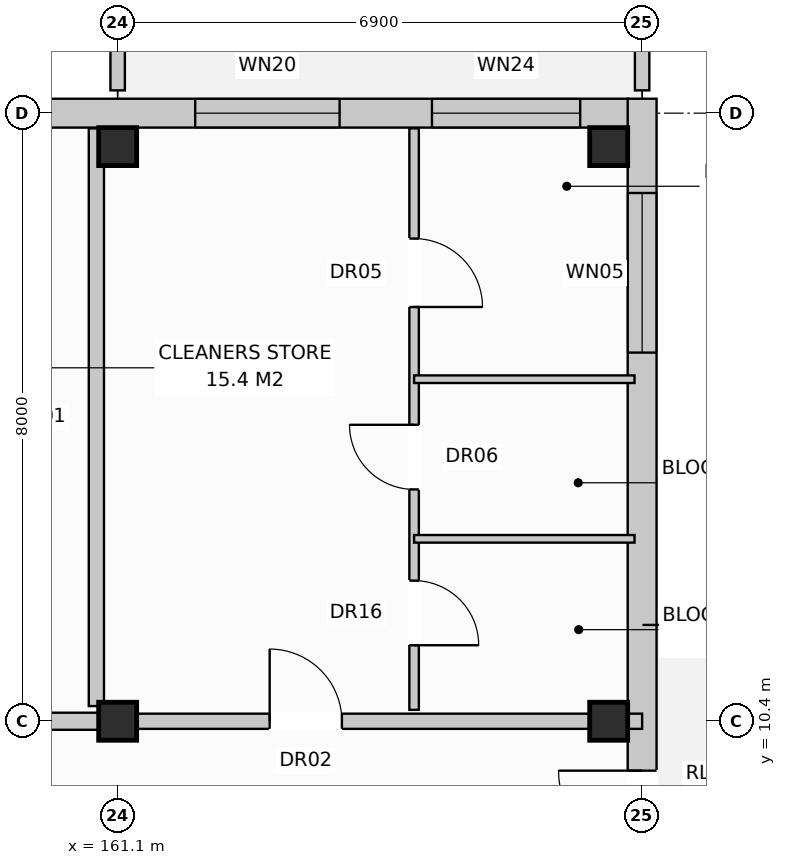
"""IFC4 building model, lengths in metres.
Left out: names, types, materials, properties, quantities, classifications, styles, units other than length and angle.
Written with IfcOpenShell. Run it as: python <this file> out.ifc"""

import sys

from ifc_helpers import new_model, si_unit, direction, frame, frame_2d, origin, origin_with_axes, origin_2d, place, context, subcontext, project, spatial, rectangle, extrude, element, fill, save


model = new_model("IFC4")
c1 = context("Model", 3, precision=1e-05, world=origin(), true_north=direction((0.0, 1.0)))
c2 = subcontext(c1, "Body", "Model", "MODEL_VIEW")
j1 = project(units=[si_unit("LENGTHUNIT", "METRE"), si_unit("PLANEANGLEUNIT", "RADIAN")], contexts=[c1])
p1 = place(None, origin())
s1 = spatial("IfcSite", under=j1, at=p1, CompositionType="ELEMENT")
p2 = place(p1, origin())
s2 = spatial("IfcBuilding", under=s1, at=p2, CompositionType="ELEMENT")
p3 = place(p2, frame((0.0, 0.0, 4.4)))
s3 = spatial("IfcBuildingStorey", under=s2, at=p3, CompositionType="ELEMENT", Elevation=4.4)
for number, where, z_axis, x_axis in (
    (1, (161.1, 10.4, 0.0), (0.0, 0.0, 1.0), (1.0, 0.0, 0.0)),
    (2, (161.1, 17.96, 0.0), (0.0, 0.0, 1.0), (1.0, 0.0, 0.0)),
    (3, (167.56, 10.4, 0.0), (0.0, 0.0, 1.0), (1.0, 0.0, 0.0)),
    (4, (167.56, 17.96, 0.0), (0.0, 0.0, 1.0), (1.0, 0.0, 0.0)),
):
    element("IfcColumn", number, at=place(p3, frame(where, z_axis=z_axis, x_axis=x_axis)), inside=s3, PredefinedType="COLUMN", context=c2, shape_type="SweptSolid", body=[
        extrude(rectangle(XDim=0.5, YDim=0.5, at=origin_2d()), origin(), (0.0, 0.0, 1.0), 3.6),
    ])
p4 = place(p3, frame((150.95, 18.4, 0.0), z_axis=(0.0, 0.0, 1.0), x_axis=(1.0, 0.0, 0.0)))
e5 = element("IfcWall", 5, at=p4, inside=s3, PredefinedType="STANDARD", context=c2, shape_type="SweptSolid", body=[
    extrude(rectangle(XDim=16.87, YDim=0.38, at=frame_2d((8.435, 0.0))), origin(), (0.0, 0.0, 1.0), 3.33),
])
p5 = place(p4, frame((11.17, 0.0, 0.8)))
e6 = element("IfcOpeningElement", 6, at=p5, cuts=e5, PredefinedType="OPENING", context=c2, shape_type="SweptSolid", body=[
    extrude(rectangle(XDim=1.9, YDim=1.85, at=frame_2d((0.95, 0.925))), frame((0.0, 0.202, 0.0), z_axis=(0.0, -1.0, 0.0), x_axis=(1.0, 0.0, 0.0)), (0.0, 0.0, 1.0), 0.404),
])
p6 = place(p4, frame((14.285, 0.0, 0.8)))
e7 = element("IfcOpeningElement", 7, at=p6, cuts=e5, PredefinedType="OPENING", context=c2, shape_type="SweptSolid", body=[
    extrude(rectangle(XDim=1.95, YDim=1.65, at=frame_2d((0.975, 0.825))), frame((0.0, 0.202, 0.0), z_axis=(0.0, -1.0, 0.0), x_axis=(1.0, 0.0, 0.0)), (0.0, 0.0, 1.0), 0.404),
])
p7 = place(p3, frame((168.0, -0.19, 0.0), z_axis=(0.0, 0.0, 1.0), x_axis=(0.0, 1.0, 0.0)))
e8 = element("IfcWall", 8, at=p7, inside=s3, PredefinedType="STANDARD", context=c2, shape_type="SweptSolid", body=[
    extrude(rectangle(XDim=18.78, YDim=0.38, at=frame_2d((9.39, 0.0))), origin(), (0.0, 0.0, 1.0), 3.33),
])
p8 = place(p7, frame((8.84, 0.0, 0.0)))
e9 = element("IfcOpeningElement", 9, at=p8, cuts=e8, PredefinedType="OPENING", context=c2, shape_type="SweptSolid", body=[
    extrude(rectangle(XDim=1.1, YDim=2.1, at=frame_2d((0.55, 1.05))), frame((0.0, 0.202, 0.0), z_axis=(0.0, -1.0, 0.0), x_axis=(1.0, 0.0, 0.0)), (0.0, 0.0, 1.0), 0.404),
])
p9 = place(p7, frame((1.24, 0.0, 0.72)))
e10 = element("IfcOpeningElement", 10, at=p9, cuts=e8, PredefinedType="OPENING", context=c2, shape_type="SweptSolid", body=[
    extrude(rectangle(XDim=2.1, YDim=1.9, at=frame_2d((1.05, 0.95))), frame((0.0, 0.202, 0.0), z_axis=(0.0, -1.0, 0.0), x_axis=(1.0, 0.0, 0.0)), (0.0, 0.0, 1.0), 0.404),
])
p10 = place(p7, frame((15.44, 0.0, 0.72)))
e11 = element("IfcOpeningElement", 11, at=p10, cuts=e8, PredefinedType="OPENING", context=c2, shape_type="SweptSolid", body=[
    extrude(rectangle(XDim=2.1, YDim=1.9, at=frame_2d((1.05, 0.95))), frame((0.0, 0.202, 0.0), z_axis=(0.0, -1.0, 0.0), x_axis=(1.0, 0.0, 0.0)), (0.0, 0.0, 1.0), 0.404),
])
for number, where, z_axis, x_axis in (
    (12, (168.0, 18.7, 0.0), (0.0, 0.0, 1.0), (0.0, 1.0, 0.0)),
    (13, (161.1, 25.8, 0.0), (0.0, 0.0, 1.0), (0.0, -1.0, 0.0)),
):
    element("IfcWall", number, at=place(p3, frame(where, z_axis=z_axis, x_axis=x_axis)), inside=s3, PredefinedType="PARAPET", context=c2, shape_type="SweptSolid", body=[
        extrude(rectangle(XDim=7.1, YDim=0.19, at=frame_2d((3.55, 0.0))), origin(), (0.0, 0.0, 1.0), 1.1),
    ])
p11 = place(p3, frame((160.82, 10.6, 0.0), z_axis=(0.0, 0.0, 1.0), x_axis=(0.0, 1.0, 0.0)))
e14 = element("IfcWall", 14, at=p11, inside=s3, PredefinedType="PARTITIONING", context=c2, shape_type="SweptSolid", body=[
    extrude(rectangle(XDim=7.6, YDim=0.2, at=frame_2d((3.8, 0.0))), origin(), (0.0, 0.0, 1.0), 2.77),
])
p12 = place(p3, frame((151.1, 10.4, 0.0), z_axis=(0.0, 0.0, 1.0), x_axis=(1.0, 0.0, 0.0)))
e15 = element("IfcWall", 15, at=p12, inside=s3, PredefinedType="PARTITIONING", context=c2, shape_type="SweptSolid", body=[
    extrude(rectangle(XDim=10.0, YDim=0.225, at=frame_2d((5.0, 0.0))), origin(), (0.0, 0.0, 1.0), 2.77),
])
p13 = place(p12, frame((0.475, 0.0, 0.0)))
e16 = element("IfcOpeningElement", 16, at=p13, cuts=e15, PredefinedType="OPENING", context=c2, shape_type="SweptSolid", body=[
    extrude(rectangle(XDim=1.1, YDim=2.15, at=frame_2d((0.55, 1.075))), frame((0.0, 0.125, 0.0), z_axis=(0.0, -1.0, 0.0), x_axis=(1.0, 0.0, 0.0)), (0.0, 0.0, 1.0), 0.249),
])
p14 = place(p12, frame((5.85, 0.0, 0.0)))
e17 = element("IfcOpeningElement", 17, at=p14, cuts=e15, PredefinedType="OPENING", context=c2, shape_type="SweptSolid", body=[
    extrude(rectangle(XDim=0.9, YDim=2.1, at=frame_2d((0.45, 1.05))), frame((0.0, 0.125, 0.0), z_axis=(0.0, -1.0, 0.0), x_axis=(1.0, 0.0, 0.0)), (0.0, 0.0, 1.0), 0.249),
])
p15 = place(p12, frame((7.9, 0.0, 0.0)))
e18 = element("IfcOpeningElement", 18, at=p15, cuts=e15, PredefinedType="OPENING", context=c2, shape_type="SweptSolid", body=[
    extrude(rectangle(XDim=0.95, YDim=2.15, at=frame_2d((0.475, 1.075))), frame((0.0, 0.125, 0.0), z_axis=(0.0, -1.0, 0.0), x_axis=(1.0, 0.0, 0.0)), (0.0, 0.0, 1.0), 0.249),
])
p16 = place(p3, frame((161.1, 10.4, 0.0), z_axis=(0.0, 0.0, 1.0), x_axis=(1.0, 0.0, 0.0)))
e19 = element("IfcWall", 19, at=p16, inside=s3, PredefinedType="PARTITIONING", context=c2, shape_type="SweptSolid", body=[
    extrude(rectangle(XDim=6.9, YDim=0.2, at=frame_2d((3.45, 0.0))), origin(), (0.0, 0.0, 1.0), 2.77),
])
p17 = place(p16, frame((2.0, 0.0, 0.0)))
e20 = element("IfcOpeningElement", 20, at=p17, cuts=e19, PredefinedType="OPENING", context=c2, shape_type="SweptSolid", body=[
    extrude(rectangle(XDim=0.95, YDim=2.15, at=frame_2d((0.475, 1.075))), frame((0.0, 0.112, 0.0), z_axis=(0.0, -1.0, 0.0), x_axis=(1.0, 0.0, 0.0)), (0.0, 0.0, 1.0), 0.224),
])
p18 = place(p3, frame((165.0, 10.55, 0.0), z_axis=(0.0, 0.0, 1.0), x_axis=(0.0, 1.0, 0.0)))
e21 = element("IfcWall", 21, at=p18, inside=s3, PredefinedType="PARTITIONING", context=c2, shape_type="SweptSolid", body=[
    extrude(rectangle(XDim=7.65, YDim=0.125, at=frame_2d((3.825, 0.0))), origin(), (0.0, 0.0, 1.0), 2.99),
])
p19 = place(p18, frame((0.85, 0.0, 0.0)))
e22 = element("IfcOpeningElement", 22, at=p19, cuts=e21, PredefinedType="OPENING", context=c2, shape_type="SweptSolid", body=[
    extrude(rectangle(XDim=0.85, YDim=2.1, at=frame_2d((0.425, 1.05))), frame((0.0, 0.074, 0.0), z_axis=(0.0, -1.0, 0.0), x_axis=(1.0, 0.0, 0.0)), (0.0, 0.0, 1.0), 0.149),
])
p20 = place(p18, frame((2.9, 0.0, 0.0)))
e23 = element("IfcOpeningElement", 23, at=p20, cuts=e21, PredefinedType="OPENING", context=c2, shape_type="SweptSolid", body=[
    extrude(rectangle(XDim=0.85, YDim=2.05, at=frame_2d((0.425, 1.025))), frame((0.0, 0.074, 0.0), z_axis=(0.0, -1.0, 0.0), x_axis=(1.0, 0.0, 0.0)), (0.0, 0.0, 1.0), 0.149),
])
p21 = place(p18, frame((5.3, 0.0, 0.0)))
e24 = element("IfcOpeningElement", 24, at=p21, cuts=e21, PredefinedType="OPENING", context=c2, shape_type="SweptSolid", body=[
    extrude(rectangle(XDim=0.9, YDim=2.1, at=frame_2d((0.45, 1.05))), frame((0.0, 0.074, 0.0), z_axis=(0.0, -1.0, 0.0), x_axis=(1.0, 0.0, 0.0)), (0.0, 0.0, 1.0), 0.149),
])
for number, where, z_axis, x_axis in (
    (25, (165.0, 12.8, 0.0), (0.0, 0.0, 1.0), (1.0, 0.0, 0.0)),
    (26, (165.0, 14.9, 0.0), (0.0, 0.0, 1.0), (1.0, 0.0, 0.0)),
):
    element("IfcWall", number, at=place(p3, frame(where, z_axis=z_axis, x_axis=x_axis)), inside=s3, PredefinedType="PARTITIONING", context=c2, shape_type="SweptSolid", body=[
        extrude(rectangle(XDim=2.9, YDim=0.1, at=frame_2d((1.45, 0.0))), origin(), (0.0, 0.0, 1.0), 3.33),
    ])
p22 = place(p5, origin_with_axes())
e27 = element("IfcWindow", 27, at=p22, inside=s3, PartitioningType="SINGLE_PANEL", PredefinedType="WINDOW", context=c2, shape_type="SweptSolid", body=[
    extrude(rectangle(XDim=1.9, YDim=1.85, at=frame_2d((0.95, 0.925))), frame((0.0, 0.03, 0.0), z_axis=(0.0, -1.0, 0.0), x_axis=(1.0, 0.0, 0.0)), (0.0, 0.0, 1.0), 0.06),
])
fill(e6, e27)
p23 = place(p6, origin_with_axes())
e28 = element("IfcWindow", 28, at=p23, inside=s3, PartitioningType="SINGLE_PANEL", PredefinedType="WINDOW", context=c2, shape_type="SweptSolid", body=[
    extrude(rectangle(XDim=1.95, YDim=1.65, at=frame_2d((0.975, 0.825))), frame((0.0, 0.03, 0.0), z_axis=(0.0, -1.0, 0.0), x_axis=(1.0, 0.0, 0.0)), (0.0, 0.0, 1.0), 0.06),
])
fill(e7, e28)
p24 = place(p8, origin_with_axes())
e29 = element("IfcDoor", 29, at=p24, inside=s3, OperationType="SINGLE_SWING_RIGHT", PredefinedType="DOOR", context=c2, shape_type="SweptSolid", body=[
    extrude(rectangle(XDim=1.1, YDim=2.1, at=frame_2d((0.55, 1.05))), frame((0.0, 0.025, 0.0), z_axis=(0.0, -1.0, 0.0), x_axis=(1.0, 0.0, 0.0)), (0.0, 0.0, 1.0), 0.05),
])
fill(e9, e29)
p25 = place(p10, origin_with_axes())
e30 = element("IfcWindow", 30, at=p25, inside=s3, PartitioningType="SINGLE_PANEL", PredefinedType="WINDOW", context=c2, shape_type="SweptSolid", body=[
    extrude(rectangle(XDim=2.1, YDim=1.9, at=frame_2d((1.05, 0.95))), frame((0.0, 0.03, 0.0), z_axis=(0.0, -1.0, 0.0), x_axis=(1.0, 0.0, 0.0)), (0.0, 0.0, 1.0), 0.06),
])
fill(e11, e30)
p26 = place(p17, origin_with_axes())
e31 = element("IfcDoor", 31, at=p26, inside=s3, OperationType="SINGLE_SWING_LEFT", PredefinedType="DOOR", context=c2, shape_type="SweptSolid", body=[
    extrude(rectangle(XDim=0.95, YDim=2.15, at=frame_2d((0.475, 1.075))), frame((0.0, 0.025, 0.0), z_axis=(0.0, -1.0, 0.0), x_axis=(1.0, 0.0, 0.0)), (0.0, 0.0, 1.0), 0.05),
])
fill(e20, e31)
p27 = place(p19, frame((0.85, 0.0, 0.0), z_axis=(0.0, 0.0, 1.0), x_axis=(-1.0, 0.0, 0.0)))
e32 = element("IfcDoor", 32, at=p27, inside=s3, OperationType="SINGLE_SWING_LEFT", PredefinedType="DOOR", context=c2, shape_type="SweptSolid", body=[
    extrude(rectangle(XDim=0.85, YDim=2.1, at=frame_2d((0.425, 1.05))), frame((0.0, 0.025, 0.0), z_axis=(0.0, -1.0, 0.0), x_axis=(1.0, 0.0, 0.0)), (0.0, 0.0, 1.0), 0.05),
])
fill(e22, e32)
p28 = place(p20, origin_with_axes())
e33 = element("IfcDoor", 33, at=p28, inside=s3, OperationType="SINGLE_SWING_RIGHT", PredefinedType="DOOR", context=c2, shape_type="SweptSolid", body=[
    extrude(rectangle(XDim=0.85, YDim=2.05, at=frame_2d((0.425, 1.025))), frame((0.0, 0.025, 0.0), z_axis=(0.0, -1.0, 0.0), x_axis=(1.0, 0.0, 0.0)), (0.0, 0.0, 1.0), 0.05),
])
fill(e23, e33)
p29 = place(p21, frame((0.9, 0.0, 0.0), z_axis=(0.0, 0.0, 1.0), x_axis=(-1.0, 0.0, 0.0)))
e34 = element("IfcDoor", 34, at=p29, inside=s3, OperationType="SINGLE_SWING_LEFT", PredefinedType="DOOR", context=c2, shape_type="SweptSolid", body=[
    extrude(rectangle(XDim=0.9, YDim=2.1, at=frame_2d((0.45, 1.05))), frame((0.0, 0.025, 0.0), z_axis=(0.0, -1.0, 0.0), x_axis=(1.0, 0.0, 0.0)), (0.0, 0.0, 1.0), 0.05),
])
fill(e24, e34)
save(model, sys.argv[1])
